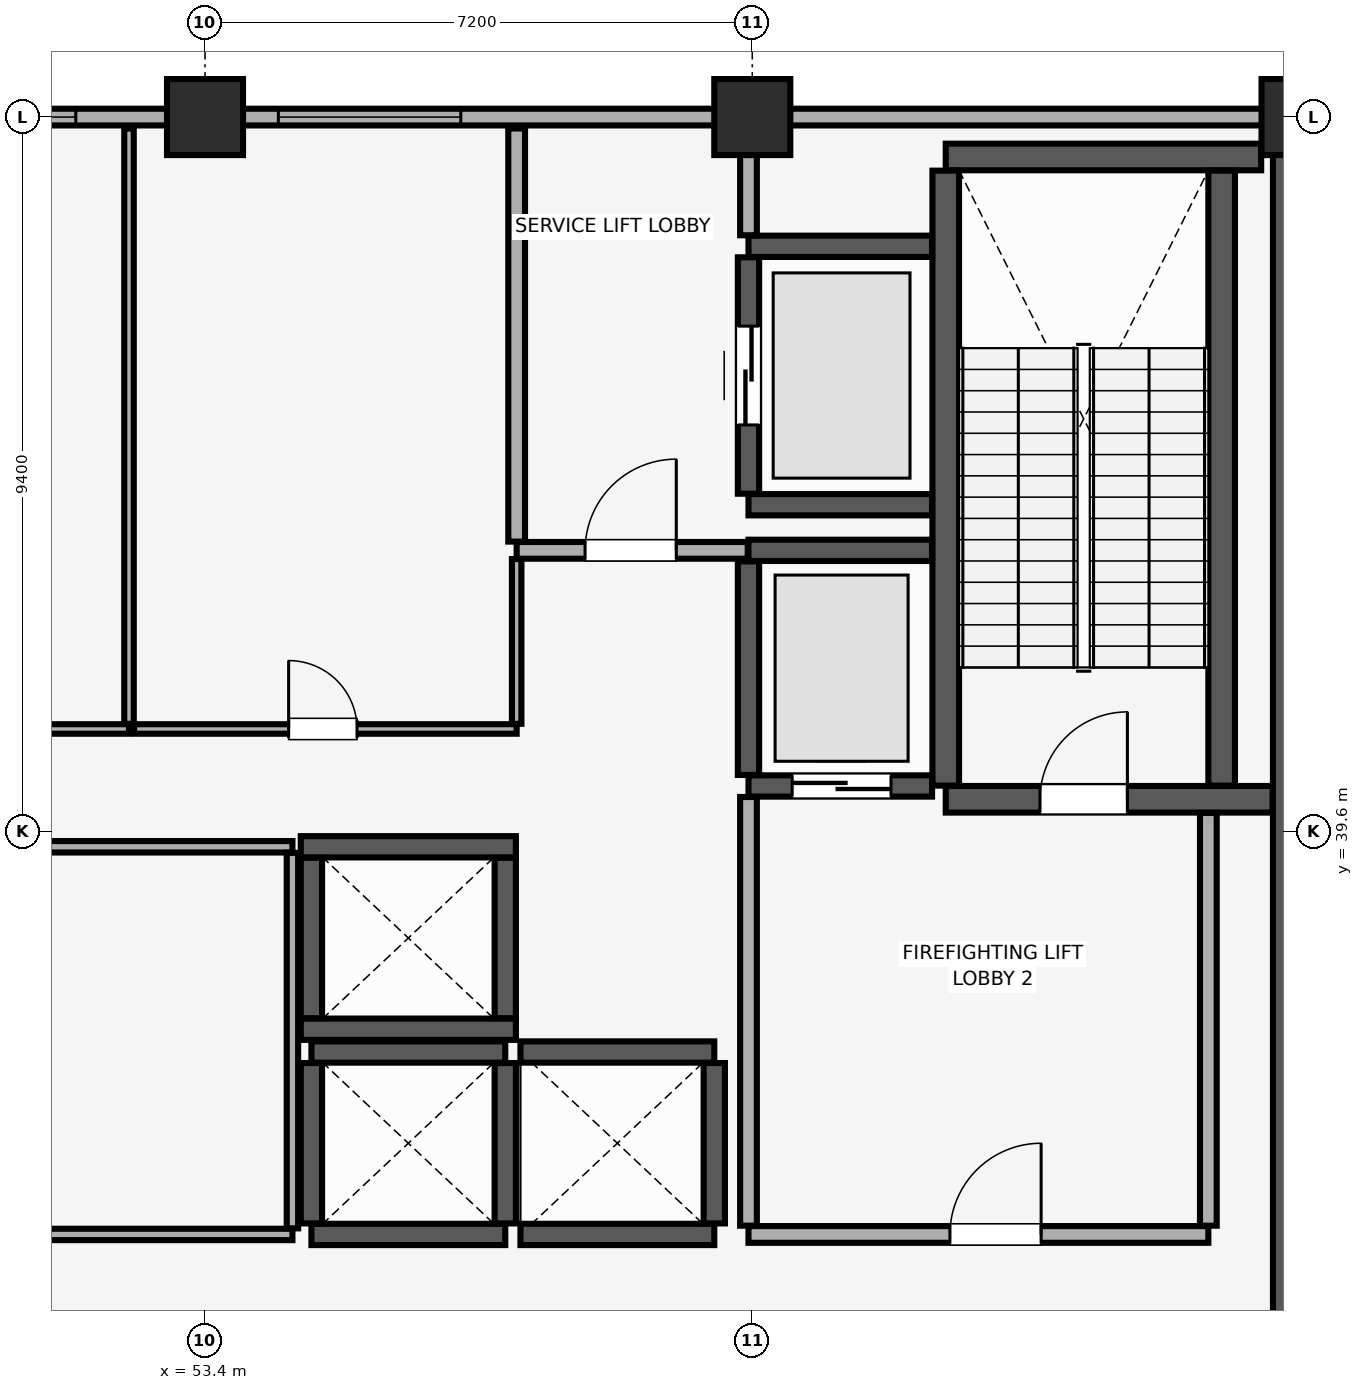
"""IFC4 building model, lengths in metres.
Left out: names, types, materials, properties, quantities, classifications, styles, units other than length and angle.
Written with IfcOpenShell. Run it as: python <this file> out.ifc"""

import sys

from ifc_helpers import new_model, si_unit, direction, frame, frame_2d, origin, origin_2d, place, context, subcontext, project, spatial, rectangle, extrude, element, fill, save


model = new_model("IFC4")
c1 = context("Model", 3, precision=1e-05, world=origin(), true_north=direction((0.0, 1.0)))
c2 = subcontext(c1, "Body", "Model", "MODEL_VIEW")
j1 = project(units=[si_unit("LENGTHUNIT", "METRE"), si_unit("PLANEANGLEUNIT", "RADIAN")], contexts=[c1])
p1 = place(None, origin())
s1 = spatial("IfcSite", under=j1, at=p1, CompositionType="ELEMENT")
p2 = place(p1, origin())
s2 = spatial("IfcBuilding", under=s1, at=p2, CompositionType="ELEMENT")
p3 = place(p2, frame((0.0, 0.0, 300.2)))
s3 = spatial("IfcBuildingStorey", under=s2, at=p3, CompositionType="ELEMENT", Elevation=300.2)
for number, where, z_axis, x_axis in (
    (1, (53.4, 49.0, 0.0), (0.0, 0.0, 1.0), (1.0, 0.0, 0.0)),
    (2, (60.6, 49.0, 0.0), (0.0, 0.0, 1.0), (1.0, 0.0, 0.0)),
    (3, (67.8, 49.0, 0.0), (0.0, 0.0, 1.0), (1.0, 0.0, 0.0)),
):
    element("IfcColumn", number, at=place(p3, frame(where, z_axis=z_axis, x_axis=x_axis)), inside=s3, PredefinedType="COLUMN", context=c2, shape_type="SweptSolid", body=[
        extrude(rectangle(XDim=1.0, YDim=1.0, at=origin_2d()), origin(), (0.0, 0.0, 1.0), 5.12),
    ])
p4 = place(p3, frame((71.4, 49.0, 0.0), z_axis=(0.0, 0.0, 1.0), x_axis=(-1.0, 0.0, 0.0)))
e4 = element("IfcWall", 4, at=p4, inside=s3, PredefinedType="SOLIDWALL", context=c2, shape_type="SweptSolid", body=[
    extrude(rectangle(XDim=58.8, YDim=0.22, at=frame_2d((29.4, 0.0))), origin(), (0.0, 0.0, 1.0), 4.32),
])
p5 = place(p4, frame((56.365, 0.0, 0.85)))
e5 = element("IfcOpeningElement", 5, at=p5, cuts=e4, PredefinedType="OPENING", context=c2, shape_type="SweptSolid", body=[
    extrude(rectangle(XDim=1.5, YDim=1.4, at=frame_2d((0.75, 0.7))), frame((0.0, 0.12, 0.0), z_axis=(0.0, -1.0, 0.0), x_axis=(1.0, 0.0, 0.0)), (0.0, 0.0, 1.0), 0.24),
])
p6 = place(p4, frame((0.935, 0.0, 0.85)))
e6 = element("IfcOpeningElement", 6, at=p6, cuts=e4, PredefinedType="OPENING", context=c2, shape_type="SweptSolid", body=[
    extrude(rectangle(XDim=1.5, YDim=1.4, at=frame_2d((0.75, 0.7))), frame((0.0, 0.12, 0.0), z_axis=(0.0, -1.0, 0.0), x_axis=(1.0, 0.0, 0.0)), (0.0, 0.0, 1.0), 0.24),
])
p7 = place(p4, frame((41.915, 0.0, 0.9)))
e7 = element("IfcOpeningElement", 7, at=p7, cuts=e4, PredefinedType="OPENING", context=c2, shape_type="SweptSolid", body=[
    extrude(rectangle(XDim=3.6, YDim=1.5, at=frame_2d((1.8, 0.75))), frame((0.0, 0.12, 0.0), z_axis=(0.0, -1.0, 0.0), x_axis=(1.0, 0.0, 0.0)), (0.0, 0.0, 1.0), 0.24),
])
p8 = place(p4, frame((36.85, 0.0, 0.9)))
e8 = element("IfcOpeningElement", 8, at=p8, cuts=e4, PredefinedType="OPENING", context=c2, shape_type="SweptSolid", body=[
    extrude(rectangle(XDim=3.0, YDim=1.5, at=frame_2d((1.5, 0.75))), frame((0.0, 0.12, 0.0), z_axis=(0.0, -1.0, 0.0), x_axis=(1.0, 0.0, 0.0)), (0.0, 0.0, 1.0), 0.24),
])
p9 = place(p4, frame((19.7, 0.0, 0.9)))
e9 = element("IfcOpeningElement", 9, at=p9, cuts=e4, PredefinedType="OPENING", context=c2, shape_type="SweptSolid", body=[
    extrude(rectangle(XDim=3.6, YDim=1.5, at=frame_2d((1.8, 0.75))), frame((0.0, 0.12, 0.0), z_axis=(0.0, -1.0, 0.0), x_axis=(1.0, 0.0, 0.0)), (0.0, 0.0, 1.0), 0.24),
])
p10 = place(p4, frame((14.635, 0.0, 0.9)))
e10 = element("IfcOpeningElement", 10, at=p10, cuts=e4, PredefinedType="OPENING", context=c2, shape_type="SweptSolid", body=[
    extrude(rectangle(XDim=2.4, YDim=1.5, at=frame_2d((1.2, 0.75))), frame((0.0, 0.12, 0.0), z_axis=(0.0, -1.0, 0.0), x_axis=(1.0, 0.0, 0.0)), (0.0, 0.0, 1.0), 0.24),
])
p11 = place(p3, frame((67.8, 29.4, 0.0), z_axis=(0.0, 0.0, 1.0), x_axis=(0.0, 1.0, 0.0)))
e11 = element("IfcWall", 11, at=p11, inside=s3, PredefinedType="SHEAR", context=c2, shape_type="SweptSolid", body=[
    extrude(rectangle(XDim=19.2, YDim=0.7, at=frame_2d((9.6, 0.0))), origin(), (0.0, 0.0, 1.0), 5.12),
])
p12 = place(p3, frame((63.145, 40.025, 0.0), z_axis=(0.0, 0.0, 1.0), x_axis=(1.0, 0.0, 0.0)))
e12 = element("IfcWall", 12, at=p12, inside=s3, PredefinedType="SHEAR", context=c2, shape_type="SweptSolid", body=[
    extrude(rectangle(XDim=4.3, YDim=0.35, at=frame_2d((2.15, 0.0))), origin(), (0.0, 0.0, 1.0), 5.12),
])
p13 = place(p12, frame((1.24, 0.0, 0.0)))
e13 = element("IfcOpeningElement", 13, at=p13, cuts=e12, PredefinedType="OPENING", context=c2, shape_type="SweptSolid", body=[
    extrude(rectangle(XDim=1.15, YDim=2.15, at=frame_2d((0.575, 1.075))), frame((0.0, 0.185, 0.0), z_axis=(0.0, -1.0, 0.0), x_axis=(1.0, 0.0, 0.0)), (0.0, 0.0, 1.0), 0.37),
])
p14 = place(p3, frame((63.145, 48.475, 0.0), z_axis=(0.0, 0.0, 1.0), x_axis=(1.0, 0.0, 0.0)))
e14 = element("IfcWall", 14, at=p14, inside=s3, PredefinedType="SHEAR", context=c2, shape_type="SweptSolid", body=[
    extrude(rectangle(XDim=4.15, YDim=0.35, at=frame_2d((2.075, 0.0))), origin(), (0.0, 0.0, 1.0), 5.12),
])
for number, where, z_axis, x_axis in (
    (15, (63.145, 40.205, 0.0), (0.0, 0.0, 1.0), (0.0, 1.0, 0.0)),
    (16, (66.775, 40.205, 0.0), (0.0, 0.0, 1.0), (0.0, 1.0, 0.0)),
):
    element("IfcWall", number, at=place(p3, frame(where, z_axis=z_axis, x_axis=x_axis)), inside=s3, PredefinedType="SHEAR", context=c2, shape_type="SweptSolid", body=[
        extrude(rectangle(XDim=8.09, YDim=0.35, at=frame_2d((4.045, 0.0))), origin(), (0.0, 0.0, 1.0), 5.12),
    ])
for number, where, z_axis, x_axis in (
    (17, (54.8, 34.3, 0.0), (0.0, 0.0, 1.0), (1.0, 0.0, 0.0)),
    (18, (54.8, 36.7, 0.0), (0.0, 0.0, 1.0), (1.0, 0.0, 0.0)),
):
    element("IfcWall", number, at=place(p3, frame(where, z_axis=z_axis, x_axis=x_axis)), inside=s3, PredefinedType="SHEAR", context=c2, shape_type="SweptSolid", body=[
        extrude(rectangle(XDim=2.55, YDim=0.28, at=frame_2d((1.275, 0.0))), origin(), (0.0, 0.0, 1.0), 5.12),
    ])
for number, where, z_axis, x_axis in (
    (19, (54.8, 34.445, 0.0), (0.0, 0.0, 1.0), (0.0, 1.0, 0.0)),
    (20, (57.35, 34.445, 0.0), (0.0, 0.0, 1.0), (0.0, 1.0, 0.0)),
):
    element("IfcWall", number, at=place(p3, frame(where, z_axis=z_axis, x_axis=x_axis)), inside=s3, PredefinedType="SHEAR", context=c2, shape_type="SweptSolid", body=[
        extrude(rectangle(XDim=2.11, YDim=0.28, at=frame_2d((1.055, 0.0))), origin(), (0.0, 0.0, 1.0), 5.12),
    ])
for number, where, z_axis, x_axis in (
    (21, (57.55, 34.3, 0.0), (0.0, 0.0, 1.0), (1.0, 0.0, 0.0)),
    (22, (57.55, 36.7, 0.0), (0.0, 0.0, 1.0), (1.0, 0.0, 0.0)),
):
    element("IfcWall", number, at=place(p3, frame(where, z_axis=z_axis, x_axis=x_axis)), inside=s3, PredefinedType="SHEAR", context=c2, shape_type="SweptSolid", body=[
        extrude(rectangle(XDim=2.55, YDim=0.28, at=frame_2d((1.275, 0.0))), origin(), (0.0, 0.0, 1.0), 5.12),
    ])
p15 = place(p3, frame((60.1, 34.445, 0.0), z_axis=(0.0, 0.0, 1.0), x_axis=(0.0, 1.0, 0.0)))
e23 = element("IfcWall", 23, at=p15, inside=s3, PredefinedType="SHEAR", context=c2, shape_type="SweptSolid", body=[
    extrude(rectangle(XDim=2.11, YDim=0.28, at=frame_2d((1.055, 0.0))), origin(), (0.0, 0.0, 1.0), 5.12),
])
for number, where, z_axis, x_axis in (
    (24, (54.66, 37.0, 0.0), (0.0, 0.0, 1.0), (1.0, 0.0, 0.0)),
    (25, (54.66, 39.4, 0.0), (0.0, 0.0, 1.0), (1.0, 0.0, 0.0)),
):
    element("IfcWall", number, at=place(p3, frame(where, z_axis=z_axis, x_axis=x_axis)), inside=s3, PredefinedType="SHEAR", context=c2, shape_type="SweptSolid", body=[
        extrude(rectangle(XDim=2.83, YDim=0.28, at=frame_2d((1.415, 0.0))), origin(), (0.0, 0.0, 1.0), 5.12),
    ])
for number, where, z_axis, x_axis in (
    (26, (54.8, 37.145, 0.0), (0.0, 0.0, 1.0), (0.0, 1.0, 0.0)),
    (27, (57.35, 37.145, 0.0), (0.0, 0.0, 1.0), (0.0, 1.0, 0.0)),
):
    element("IfcWall", number, at=place(p3, frame(where, z_axis=z_axis, x_axis=x_axis)), inside=s3, PredefinedType="SHEAR", context=c2, shape_type="SweptSolid", body=[
        extrude(rectangle(XDim=2.11, YDim=0.28, at=frame_2d((1.055, 0.0))), origin(), (0.0, 0.0, 1.0), 5.12),
    ])
p16 = place(p3, frame((60.55, 40.2, 0.0), z_axis=(0.0, 0.0, 1.0), x_axis=(1.0, 0.0, 0.0)))
e28 = element("IfcWall", 28, at=p16, inside=s3, PredefinedType="SHEAR", context=c2, shape_type="SweptSolid", body=[
    extrude(rectangle(XDim=2.415, YDim=0.28, at=frame_2d((1.208, 0.0))), origin(), (0.0, 0.0, 1.0), 5.12),
])
p17 = place(p16, frame((0.575, 0.0, 0.0)))
e29 = element("IfcOpeningElement", 29, at=p17, cuts=e28, PredefinedType="OPENING", context=c2, shape_type="SweptSolid", body=[
    extrude(rectangle(XDim=1.3, YDim=2.3, at=frame_2d((0.65, 1.15))), frame((0.0, 0.15, 0.0), z_axis=(0.0, -1.0, 0.0), x_axis=(1.0, 0.0, 0.0)), (0.0, 0.0, 1.0), 0.3),
])
p18 = place(p3, frame((60.55, 43.3, 0.0), z_axis=(0.0, 0.0, 1.0), x_axis=(1.0, 0.0, 0.0)))
e30 = element("IfcWall", 30, at=p18, inside=s3, PredefinedType="SHEAR", context=c2, shape_type="SweptSolid", body=[
    extrude(rectangle(XDim=2.415, YDim=0.28, at=frame_2d((1.208, 0.0))), origin(), (0.0, 0.0, 1.0), 5.12),
])
p19 = place(p3, frame((60.55, 40.345, 0.0), z_axis=(0.0, 0.0, 1.0), x_axis=(0.0, 1.0, 0.0)))
e31 = element("IfcWall", 31, at=p19, inside=s3, PredefinedType="SHEAR", context=c2, shape_type="SweptSolid", body=[
    extrude(rectangle(XDim=2.81, YDim=0.28, at=frame_2d((1.405, 0.0))), origin(), (0.0, 0.0, 1.0), 5.12),
])
for number, where, z_axis, x_axis in (
    (32, (60.55, 43.9, 0.0), (0.0, 0.0, 1.0), (1.0, 0.0, 0.0)),
    (33, (60.55, 47.3, 0.0), (0.0, 0.0, 1.0), (1.0, 0.0, 0.0)),
):
    element("IfcWall", number, at=place(p3, frame(where, z_axis=z_axis, x_axis=x_axis)), inside=s3, PredefinedType="SHEAR", context=c2, shape_type="SweptSolid", body=[
        extrude(rectangle(XDim=2.415, YDim=0.28, at=frame_2d((1.208, 0.0))), origin(), (0.0, 0.0, 1.0), 5.12),
    ])
p20 = place(p3, frame((60.55, 44.045, 0.0), z_axis=(0.0, 0.0, 1.0), x_axis=(0.0, 1.0, 0.0)))
e34 = element("IfcWall", 34, at=p20, inside=s3, PredefinedType="SHEAR", context=c2, shape_type="SweptSolid", body=[
    extrude(rectangle(XDim=3.11, YDim=0.28, at=frame_2d((1.555, 0.0))), origin(), (0.0, 0.0, 1.0), 5.12),
])
p21 = place(p20, frame((0.905, 0.0, 0.0)))
e35 = element("IfcOpeningElement", 35, at=p21, cuts=e34, PredefinedType="OPENING", context=c2, shape_type="SweptSolid", body=[
    extrude(rectangle(XDim=1.3, YDim=2.3, at=frame_2d((0.65, 1.15))), frame((0.0, 0.15, 0.0), z_axis=(0.0, -1.0, 0.0), x_axis=(1.0, 0.0, 0.0)), (0.0, 0.0, 1.0), 0.3),
])
p22 = place(p3, frame((60.55, 34.3, 0.0), z_axis=(0.0, 0.0, 1.0), x_axis=(1.0, 0.0, 0.0)))
e36 = element("IfcWall", 36, at=p22, inside=s3, PredefinedType="PARTITIONING", context=c2, shape_type="SweptSolid", body=[
    extrude(rectangle(XDim=6.05, YDim=0.22, at=frame_2d((3.025, 0.0))), origin(), (0.0, 0.0, 1.0), 5.12),
])
p23 = place(p22, frame((2.65, 0.0, 0.0)))
e37 = element("IfcOpeningElement", 37, at=p23, cuts=e36, PredefinedType="OPENING", context=c2, shape_type="SweptSolid", body=[
    extrude(rectangle(XDim=1.2, YDim=2.15, at=frame_2d((0.6, 1.075))), frame((0.0, 0.12, 0.0), z_axis=(0.0, -1.0, 0.0), x_axis=(1.0, 0.0, 0.0)), (0.0, 0.0, 1.0), 0.24),
])
p24 = place(p3, frame((60.55, 34.415, 0.0), z_axis=(0.0, 0.0, 1.0), x_axis=(0.0, 1.0, 0.0)))
e38 = element("IfcWall", 38, at=p24, inside=s3, PredefinedType="PARTITIONING", context=c2, shape_type="SweptSolid", body=[
    extrude(rectangle(XDim=5.64, YDim=0.22, at=frame_2d((2.82, 0.0))), origin(), (0.0, 0.0, 1.0), 5.12),
])
p25 = place(p3, frame((66.6, 34.415, 0.0), z_axis=(0.0, 0.0, 1.0), x_axis=(0.0, 1.0, 0.0)))
e39 = element("IfcWall", 39, at=p25, inside=s3, PredefinedType="PARTITIONING", context=c2, shape_type="SweptSolid", body=[
    extrude(rectangle(XDim=5.43, YDim=0.22, at=frame_2d((2.715, 0.0))), origin(), (0.0, 0.0, 1.0), 5.12),
])
p26 = place(p3, frame((57.5, 43.3, 0.0), z_axis=(0.0, 0.0, 1.0), x_axis=(1.0, 0.0, 0.0)))
e40 = element("IfcWall", 40, at=p26, inside=s3, PredefinedType="PARTITIONING", context=c2, shape_type="SweptSolid", body=[
    extrude(rectangle(XDim=3.04, YDim=0.22, at=frame_2d((1.52, 0.0))), origin(), (0.0, 0.0, 1.0), 5.12),
])
p27 = place(p26, frame((0.9, 0.0, 0.0)))
e41 = element("IfcOpeningElement", 41, at=p27, cuts=e40, PredefinedType="OPENING", context=c2, shape_type="SweptSolid", body=[
    extrude(rectangle(XDim=1.2, YDim=2.15, at=frame_2d((0.6, 1.075))), frame((0.0, 0.12, 0.0), z_axis=(0.0, -1.0, 0.0), x_axis=(1.0, 0.0, 0.0)), (0.0, 0.0, 1.0), 0.24),
])
p28 = place(p3, frame((57.5, 43.415, 0.0), z_axis=(0.0, 0.0, 1.0), x_axis=(0.0, 1.0, 0.0)))
e42 = element("IfcWall", 42, at=p28, inside=s3, PredefinedType="PARTITIONING", context=c2, shape_type="SweptSolid", body=[
    extrude(rectangle(XDim=5.435, YDim=0.22, at=frame_2d((2.718, 0.0))), origin(), (0.0, 0.0, 1.0), 5.12),
])
p29 = place(p3, frame((60.55, 47.445, 0.0), z_axis=(0.0, 0.0, 1.0), x_axis=(0.0, 1.0, 0.0)))
e43 = element("IfcWall", 43, at=p29, inside=s3, PredefinedType="PARTITIONING", context=c2, shape_type="SweptSolid", body=[
    extrude(rectangle(XDim=1.405, YDim=0.22, at=frame_2d((0.703, 0.0))), origin(), (0.0, 0.0, 1.0), 5.12),
])
p30 = place(p3, frame((46.6, 34.3, 0.0), z_axis=(0.0, 0.0, 1.0), x_axis=(1.0, 0.0, 0.0)))
e44 = element("IfcWall", 44, at=p30, inside=s3, PredefinedType="PARTITIONING", context=c2, shape_type="SweptSolid", body=[
    extrude(rectangle(XDim=7.95, YDim=0.15, at=frame_2d((3.975, 0.0))), origin(), (0.0, 0.0, 1.0), 5.12),
])
p31 = place(p30, frame((3.4, 0.0, 0.0)))
e45 = element("IfcOpeningElement", 45, at=p31, cuts=e44, PredefinedType="OPENING", context=c2, shape_type="SweptSolid", body=[
    extrude(rectangle(XDim=1.0, YDim=2.15, at=frame_2d((0.5, 1.075))), frame((0.0, 0.085, 0.0), z_axis=(0.0, -1.0, 0.0), x_axis=(1.0, 0.0, 0.0)), (0.0, 0.0, 1.0), 0.17),
])
p32 = place(p3, frame((46.6, 39.4, 0.0), z_axis=(0.0, 0.0, 1.0), x_axis=(1.0, 0.0, 0.0)))
e46 = element("IfcWall", 46, at=p32, inside=s3, PredefinedType="PARTITIONING", context=c2, shape_type="SweptSolid", body=[
    extrude(rectangle(XDim=7.95, YDim=0.15, at=frame_2d((3.975, 0.0))), origin(), (0.0, 0.0, 1.0), 5.12),
])
p33 = place(p3, frame((54.55, 34.38, 0.0), z_axis=(0.0, 0.0, 1.0), x_axis=(0.0, 1.0, 0.0)))
e47 = element("IfcWall", 47, at=p33, inside=s3, PredefinedType="PARTITIONING", context=c2, shape_type="SweptSolid", body=[
    extrude(rectangle(XDim=4.94, YDim=0.15, at=frame_2d((2.47, 0.0))), origin(), (0.0, 0.0, 1.0), 5.12),
])
p34 = place(p3, frame((47.468, 40.95, 0.0), z_axis=(0.0, 0.0, 1.0), x_axis=(1.0, 0.0, 0.0)))
e48 = element("IfcWall", 48, at=p34, inside=s3, PredefinedType="PARTITIONING", context=c2, shape_type="SweptSolid", body=[
    extrude(rectangle(XDim=4.932, YDim=0.125, at=frame_2d((2.466, 0.0))), origin(), (0.0, 0.0, 1.0), 5.12),
])
p35 = place(p34, frame((1.982, 0.0, 0.0)))
e49 = element("IfcOpeningElement", 49, at=p35, cuts=e48, PredefinedType="OPENING", context=c2, shape_type="SweptSolid", body=[
    extrude(rectangle(XDim=0.9, YDim=2.1, at=frame_2d((0.45, 1.05))), frame((0.0, 0.073, 0.0), z_axis=(0.0, -1.0, 0.0), x_axis=(1.0, 0.0, 0.0)), (0.0, 0.0, 1.0), 0.145),
])
p36 = place(p3, frame((52.4, 41.018, 0.0), z_axis=(0.0, 0.0, 1.0), x_axis=(0.0, 1.0, 0.0)))
e50 = element("IfcWall", 50, at=p36, inside=s3, PredefinedType="PARTITIONING", context=c2, shape_type="SweptSolid", body=[
    extrude(rectangle(XDim=7.833, YDim=0.125, at=frame_2d((3.916, 0.0))), origin(), (0.0, 0.0, 1.0), 5.12),
])
p37 = place(p3, frame((52.468, 40.95, 0.0), z_axis=(0.0, 0.0, 1.0), x_axis=(1.0, 0.0, 0.0)))
e51 = element("IfcWall", 51, at=p37, inside=s3, PredefinedType="PARTITIONING", context=c2, shape_type="SweptSolid", body=[
    extrude(rectangle(XDim=5.032, YDim=0.125, at=frame_2d((2.516, 0.0))), origin(), (0.0, 0.0, 1.0), 5.12),
])
p38 = place(p37, frame((2.032, 0.0, 0.0)))
e52 = element("IfcOpeningElement", 52, at=p38, cuts=e51, PredefinedType="OPENING", context=c2, shape_type="SweptSolid", body=[
    extrude(rectangle(XDim=0.9, YDim=2.1, at=frame_2d((0.45, 1.05))), frame((0.0, 0.073, 0.0), z_axis=(0.0, -1.0, 0.0), x_axis=(1.0, 0.0, 0.0)), (0.0, 0.0, 1.0), 0.145),
])
p39 = place(p3, frame((57.5, 41.018, 0.0), z_axis=(0.0, 0.0, 1.0), x_axis=(0.0, 1.0, 0.0)))
e53 = element("IfcWall", 53, at=p39, inside=s3, PredefinedType="PARTITIONING", context=c2, shape_type="SweptSolid", body=[
    extrude(rectangle(XDim=2.167, YDim=0.125, at=frame_2d((1.084, 0.0))), origin(), (0.0, 0.0, 1.0), 5.12),
])
p40 = place(p9, origin())
e54 = element("IfcWindow", 54, at=p40, inside=s3, PartitioningType="SINGLE_PANEL", PredefinedType="WINDOW", context=c2, shape_type="SweptSolid", body=[
    extrude(rectangle(XDim=3.6, YDim=1.5, at=frame_2d((1.8, 0.75))), frame((0.0, 0.03, 0.0), z_axis=(0.0, -1.0, 0.0), x_axis=(1.0, 0.0, 0.0)), (0.0, 0.0, 1.0), 0.06),
])
fill(e9, e54)
p41 = place(p10, origin())
e55 = element("IfcWindow", 55, at=p41, inside=s3, PartitioningType="SINGLE_PANEL", PredefinedType="WINDOW", context=c2, shape_type="SweptSolid", body=[
    extrude(rectangle(XDim=2.4, YDim=1.5, at=frame_2d((1.2, 0.75))), frame((0.0, 0.03, 0.0), z_axis=(0.0, -1.0, 0.0), x_axis=(1.0, 0.0, 0.0)), (0.0, 0.0, 1.0), 0.06),
])
fill(e10, e55)
p42 = place(p13, origin())
e56 = element("IfcDoor", 56, at=p42, inside=s3, OperationType="SINGLE_SWING_RIGHT", PredefinedType="DOOR", context=c2, shape_type="SweptSolid", body=[
    extrude(rectangle(XDim=1.15, YDim=2.15, at=frame_2d((0.575, 1.075))), frame((0.0, 0.025, 0.0), z_axis=(0.0, -1.0, 0.0), x_axis=(1.0, 0.0, 0.0)), (0.0, 0.0, 1.0), 0.05),
])
fill(e13, e56)
p43 = place(p17, origin())
e57 = element("IfcDoor", 57, at=p43, inside=s3, OperationType="DOUBLE_DOOR_SLIDING", PredefinedType="DOOR", context=c2, shape_type="SweptSolid", body=[
    extrude(rectangle(XDim=1.3, YDim=2.3, at=frame_2d((0.65, 1.15))), frame((0.0, 0.025, 0.0), z_axis=(0.0, -1.0, 0.0), x_axis=(1.0, 0.0, 0.0)), (0.0, 0.0, 1.0), 0.05),
])
fill(e29, e57)
p44 = place(p21, origin())
e58 = element("IfcDoor", 58, at=p44, inside=s3, OperationType="DOUBLE_DOOR_SLIDING", PredefinedType="DOOR", context=c2, shape_type="SweptSolid", body=[
    extrude(rectangle(XDim=1.3, YDim=2.3, at=frame_2d((0.65, 1.15))), frame((0.0, 0.025, 0.0), z_axis=(0.0, -1.0, 0.0), x_axis=(1.0, 0.0, 0.0)), (0.0, 0.0, 1.0), 0.05),
])
fill(e35, e58)
p45 = place(p23, origin())
e59 = element("IfcDoor", 59, at=p45, inside=s3, OperationType="SINGLE_SWING_RIGHT", PredefinedType="DOOR", context=c2, shape_type="SweptSolid", body=[
    extrude(rectangle(XDim=1.2, YDim=2.15, at=frame_2d((0.6, 1.075))), frame((0.0, 0.025, 0.0), z_axis=(0.0, -1.0, 0.0), x_axis=(1.0, 0.0, 0.0)), (0.0, 0.0, 1.0), 0.05),
])
fill(e37, e59)
p46 = place(p27, origin())
e60 = element("IfcDoor", 60, at=p46, inside=s3, OperationType="SINGLE_SWING_RIGHT", PredefinedType="DOOR", context=c2, shape_type="SweptSolid", body=[
    extrude(rectangle(XDim=1.2, YDim=2.15, at=frame_2d((0.6, 1.075))), frame((0.0, 0.025, 0.0), z_axis=(0.0, -1.0, 0.0), x_axis=(1.0, 0.0, 0.0)), (0.0, 0.0, 1.0), 0.05),
])
fill(e41, e60)
p47 = place(p38, origin())
e61 = element("IfcDoor", 61, at=p47, inside=s3, OperationType="SINGLE_SWING_LEFT", PredefinedType="DOOR", context=c2, shape_type="SweptSolid", body=[
    extrude(rectangle(XDim=0.9, YDim=2.1, at=frame_2d((0.45, 1.05))), frame((0.0, 0.025, 0.0), z_axis=(0.0, -1.0, 0.0), x_axis=(1.0, 0.0, 0.0)), (0.0, 0.0, 1.0), 0.05),
])
fill(e52, e61)
save(model, sys.argv[1])
